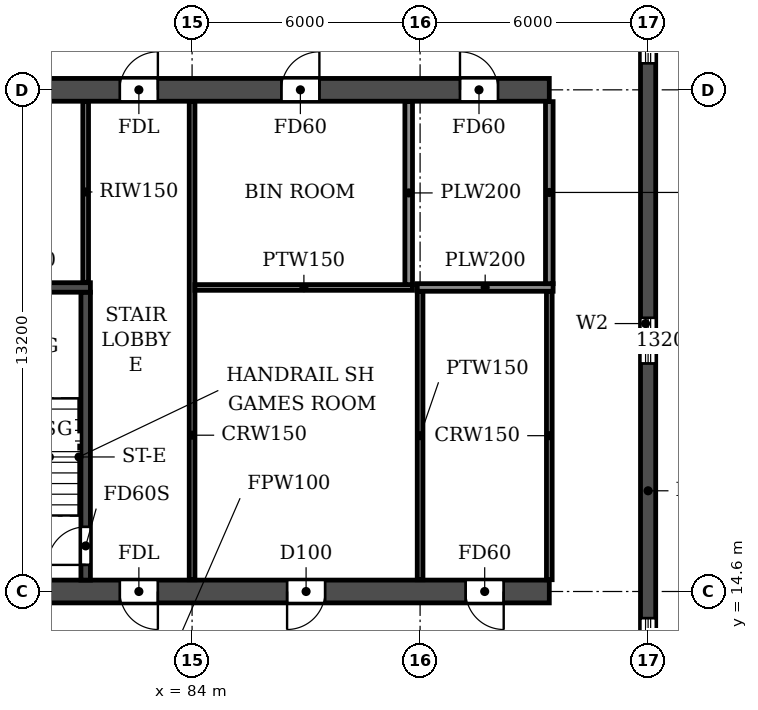
"""IFC4 building model, lengths in metres.
Left out: names, types, materials, properties, quantities, classifications, styles, units other than length and angle.
Written with IfcOpenShell. Run it as: python <this file> out.ifc"""

import sys

from ifc_helpers import new_model, si_unit, direction, frame, frame_2d, origin, place, context, subcontext, project, spatial, rectangle, extrude, element, fill, save


model = new_model("IFC4")
c1 = context("Model", 3, precision=1e-05, world=origin(), true_north=direction((0.0, 1.0)))
c2 = subcontext(c1, "Body", "Model", "MODEL_VIEW")
j1 = project(units=[si_unit("LENGTHUNIT", "METRE"), si_unit("PLANEANGLEUNIT", "RADIAN")], contexts=[c1])
p1 = place(None, origin())
s1 = spatial("IfcSite", under=j1, at=p1, CompositionType="ELEMENT")
p2 = place(p1, origin())
s2 = spatial("IfcBuilding", under=s1, at=p2, CompositionType="ELEMENT")
p3 = place(p2, frame((0.0, 0.0, 63.0)))
s3 = spatial("IfcBuildingStorey", under=s2, at=p3, CompositionType="ELEMENT", Elevation=63.0)
p4 = place(p3, frame((96.0, 4.683, 0.0), z_axis=(0.0, 0.0, 1.0), x_axis=(0.0, 1.0, 0.0)))
e1 = element("IfcWall", 1, at=p4, inside=s3, PredefinedType="SHEAR", context=c2, shape_type="SweptSolid", body=[
    extrude(rectangle(XDim=35.434, YDim=0.4, at=frame_2d((17.717, 0.0))), origin(), (0.0, 0.0, 1.0), 2.95),
])
p5 = place(p4, frame((15.917, 0.0, 0.9)))
e2 = element("IfcOpeningElement", 2, at=p5, cuts=e1, PredefinedType="OPENING", context=c2, shape_type="SweptSolid", body=[
    extrude(rectangle(XDim=1.2, YDim=1.5, at=frame_2d((0.6, 0.75))), frame((0.0, 0.21, 0.0), z_axis=(0.0, -1.0, 0.0), x_axis=(1.0, 0.0, 0.0)), (0.0, 0.0, 1.0), 0.42),
])
p6 = place(p4, frame((23.817, 0.0, 0.9)))
e3 = element("IfcOpeningElement", 3, at=p6, cuts=e1, PredefinedType="OPENING", context=c2, shape_type="SweptSolid", body=[
    extrude(rectangle(XDim=1.2, YDim=1.5, at=frame_2d((0.6, 0.75))), frame((0.0, 0.21, 0.0), z_axis=(0.0, -1.0, 0.0), x_axis=(1.0, 0.0, 0.0)), (0.0, 0.0, 1.0), 0.42),
])
p7 = place(p4, frame((8.017, 0.0, 0.9)))
e4 = element("IfcOpeningElement", 4, at=p7, cuts=e1, PredefinedType="OPENING", context=c2, shape_type="SweptSolid", body=[
    extrude(rectangle(XDim=1.2, YDim=1.5, at=frame_2d((0.6, 0.75))), frame((0.0, 0.21, 0.0), z_axis=(0.0, -1.0, 0.0), x_axis=(1.0, 0.0, 0.0)), (0.0, 0.0, 1.0), 0.42),
])
p8 = place(p4, frame((29.493, 0.0, 0.6)))
e5 = element("IfcOpeningElement", 5, at=p8, cuts=e1, PredefinedType="OPENING", context=c2, shape_type="SweptSolid", body=[
    extrude(rectangle(XDim=2.2, YDim=1.8, at=frame_2d((1.1, 0.9))), frame((0.0, 0.21, 0.0), z_axis=(0.0, -1.0, 0.0), x_axis=(1.0, 0.0, 0.0)), (0.0, 0.0, 1.0), 0.42),
])
p9 = place(p4, frame((2.541, 0.0, 0.6)))
e6 = element("IfcOpeningElement", 6, at=p9, cuts=e1, PredefinedType="OPENING", context=c2, shape_type="SweptSolid", body=[
    extrude(rectangle(XDim=2.2, YDim=1.8, at=frame_2d((1.1, 0.9))), frame((0.0, 0.21, 0.0), z_axis=(0.0, -1.0, 0.0), x_axis=(1.0, 0.0, 0.0)), (0.0, 0.0, 1.0), 0.42),
])
p10 = place(p3, frame((8.6, 14.6, 0.0), z_axis=(0.0, 0.0, 1.0), x_axis=(1.0, 0.0, 0.0)))
e7 = element("IfcWall", 7, at=p10, inside=s3, PredefinedType="SOLIDWALL", context=c2, shape_type="SweptSolid", body=[
    extrude(rectangle(XDim=84.8, YDim=0.6, at=frame_2d((42.4, 0.0))), origin(), (0.0, 0.0, 1.0), 2.95),
])
p11 = place(p10, frame((1.35, 0.0, 0.0)))
e8 = element("IfcOpeningElement", 8, at=p11, cuts=e7, PredefinedType="OPENING", context=c2, shape_type="SweptSolid", body=[
    extrude(rectangle(XDim=1.0, YDim=2.1, at=frame_2d((0.5, 1.05))), frame((0.0, 0.31, 0.0), z_axis=(0.0, -1.0, 0.0), x_axis=(1.0, 0.0, 0.0)), (0.0, 0.0, 1.0), 0.62),
])
p12 = place(p10, frame((6.05, 0.0, 0.0)))
e9 = element("IfcOpeningElement", 9, at=p12, cuts=e7, PredefinedType="OPENING", context=c2, shape_type="SweptSolid", body=[
    extrude(rectangle(XDim=1.0, YDim=2.1, at=frame_2d((0.5, 1.05))), frame((0.0, 0.31, 0.0), z_axis=(0.0, -1.0, 0.0), x_axis=(1.0, 0.0, 0.0)), (0.0, 0.0, 1.0), 0.62),
])
p13 = place(p10, frame((10.3, 0.0, 0.0)))
e10 = element("IfcOpeningElement", 10, at=p13, cuts=e7, PredefinedType="OPENING", context=c2, shape_type="SweptSolid", body=[
    extrude(rectangle(XDim=1.0, YDim=2.1, at=frame_2d((0.5, 1.05))), frame((0.0, 0.31, 0.0), z_axis=(0.0, -1.0, 0.0), x_axis=(1.0, 0.0, 0.0)), (0.0, 0.0, 1.0), 0.62),
])
p14 = place(p10, frame((18.2, 0.0, 0.0)))
e11 = element("IfcOpeningElement", 11, at=p14, cuts=e7, PredefinedType="OPENING", context=c2, shape_type="SweptSolid", body=[
    extrude(rectangle(XDim=1.0, YDim=2.1, at=frame_2d((0.5, 1.05))), frame((0.0, 0.31, 0.0), z_axis=(0.0, -1.0, 0.0), x_axis=(1.0, 0.0, 0.0)), (0.0, 0.0, 1.0), 0.62),
])
p15 = place(p10, frame((22.8, 0.0, 0.0)))
e12 = element("IfcOpeningElement", 12, at=p15, cuts=e7, PredefinedType="OPENING", context=c2, shape_type="SweptSolid", body=[
    extrude(rectangle(XDim=1.0, YDim=2.1, at=frame_2d((0.5, 1.05))), frame((0.0, 0.31, 0.0), z_axis=(0.0, -1.0, 0.0), x_axis=(1.0, 0.0, 0.0)), (0.0, 0.0, 1.0), 0.62),
])
p16 = place(p10, frame((35.4, 0.0, 0.0)))
e13 = element("IfcOpeningElement", 13, at=p16, cuts=e7, PredefinedType="OPENING", context=c2, shape_type="SweptSolid", body=[
    extrude(rectangle(XDim=1.0, YDim=2.1, at=frame_2d((0.5, 1.05))), frame((0.0, 0.31, 0.0), z_axis=(0.0, -1.0, 0.0), x_axis=(1.0, 0.0, 0.0)), (0.0, 0.0, 1.0), 0.62),
])
p17 = place(p10, frame((39.3, 0.0, 0.0)))
e14 = element("IfcOpeningElement", 14, at=p17, cuts=e7, PredefinedType="OPENING", context=c2, shape_type="SweptSolid", body=[
    extrude(rectangle(XDim=1.0, YDim=2.1, at=frame_2d((0.5, 1.05))), frame((0.0, 0.31, 0.0), z_axis=(0.0, -1.0, 0.0), x_axis=(1.0, 0.0, 0.0)), (0.0, 0.0, 1.0), 0.62),
])
p18 = place(p10, frame((41.9, 0.0, 0.0)))
e15 = element("IfcOpeningElement", 15, at=p18, cuts=e7, PredefinedType="OPENING", context=c2, shape_type="SweptSolid", body=[
    extrude(rectangle(XDim=1.0, YDim=2.1, at=frame_2d((0.5, 1.05))), frame((0.0, 0.31, 0.0), z_axis=(0.0, -1.0, 0.0), x_axis=(1.0, 0.0, 0.0)), (0.0, 0.0, 1.0), 0.62),
])
p19 = place(p10, frame((47.1, 0.0, 0.0)))
e16 = element("IfcOpeningElement", 16, at=p19, cuts=e7, PredefinedType="OPENING", context=c2, shape_type="SweptSolid", body=[
    extrude(rectangle(XDim=1.0, YDim=2.1, at=frame_2d((0.5, 1.05))), frame((0.0, 0.31, 0.0), z_axis=(0.0, -1.0, 0.0), x_axis=(1.0, 0.0, 0.0)), (0.0, 0.0, 1.0), 0.62),
])
p20 = place(p10, frame((61.0, 0.0, 0.0)))
e17 = element("IfcOpeningElement", 17, at=p20, cuts=e7, PredefinedType="OPENING", context=c2, shape_type="SweptSolid", body=[
    extrude(rectangle(XDim=1.0, YDim=2.1, at=frame_2d((0.5, 1.05))), frame((0.0, 0.31, 0.0), z_axis=(0.0, -1.0, 0.0), x_axis=(1.0, 0.0, 0.0)), (0.0, 0.0, 1.0), 0.62),
])
p21 = place(p10, frame((65.6, 0.0, 0.0)))
e18 = element("IfcOpeningElement", 18, at=p21, cuts=e7, PredefinedType="OPENING", context=c2, shape_type="SweptSolid", body=[
    extrude(rectangle(XDim=1.0, YDim=2.1, at=frame_2d((0.5, 1.05))), frame((0.0, 0.31, 0.0), z_axis=(0.0, -1.0, 0.0), x_axis=(1.0, 0.0, 0.0)), (0.0, 0.0, 1.0), 0.62),
])
p22 = place(p10, frame((73.5, 0.0, 0.0)))
e19 = element("IfcOpeningElement", 19, at=p22, cuts=e7, PredefinedType="OPENING", context=c2, shape_type="SweptSolid", body=[
    extrude(rectangle(XDim=1.0, YDim=2.1, at=frame_2d((0.5, 1.05))), frame((0.0, 0.31, 0.0), z_axis=(0.0, -1.0, 0.0), x_axis=(1.0, 0.0, 0.0)), (0.0, 0.0, 1.0), 0.62),
])
p23 = place(p10, frame((77.9, 0.0, 0.0)))
e20 = element("IfcOpeningElement", 20, at=p23, cuts=e7, PredefinedType="OPENING", context=c2, shape_type="SweptSolid", body=[
    extrude(rectangle(XDim=1.0, YDim=2.1, at=frame_2d((0.5, 1.05))), frame((0.0, 0.31, 0.0), z_axis=(0.0, -1.0, 0.0), x_axis=(1.0, 0.0, 0.0)), (0.0, 0.0, 1.0), 0.62),
])
p24 = place(p10, frame((82.6, 0.0, 0.0)))
e21 = element("IfcOpeningElement", 21, at=p24, cuts=e7, PredefinedType="OPENING", context=c2, shape_type="SweptSolid", body=[
    extrude(rectangle(XDim=1.0, YDim=2.1, at=frame_2d((0.5, 1.05))), frame((0.0, 0.31, 0.0), z_axis=(0.0, -1.0, 0.0), x_axis=(1.0, 0.0, 0.0)), (0.0, 0.0, 1.0), 0.62),
])
p25 = place(p3, frame((8.6, 27.8, 0.0), z_axis=(0.0, 0.0, 1.0), x_axis=(1.0, 0.0, 0.0)))
e22 = element("IfcWall", 22, at=p25, inside=s3, PredefinedType="SOLIDWALL", context=c2, shape_type="SweptSolid", body=[
    extrude(rectangle(XDim=84.8, YDim=0.6, at=frame_2d((42.4, 0.0))), origin(), (0.0, 0.0, 1.0), 2.95),
])
p26 = place(p25, frame((1.2, 0.0, 0.0)))
e23 = element("IfcOpeningElement", 23, at=p26, cuts=e22, PredefinedType="OPENING", context=c2, shape_type="SweptSolid", body=[
    extrude(rectangle(XDim=1.0, YDim=2.1, at=frame_2d((0.5, 1.05))), frame((0.0, 0.31, 0.0), z_axis=(0.0, -1.0, 0.0), x_axis=(1.0, 0.0, 0.0)), (0.0, 0.0, 1.0), 0.62),
])
p27 = place(p25, frame((5.9, 0.0, 0.0)))
e24 = element("IfcOpeningElement", 24, at=p27, cuts=e22, PredefinedType="OPENING", context=c2, shape_type="SweptSolid", body=[
    extrude(rectangle(XDim=1.0, YDim=2.1, at=frame_2d((0.5, 1.05))), frame((0.0, 0.31, 0.0), z_axis=(0.0, -1.0, 0.0), x_axis=(1.0, 0.0, 0.0)), (0.0, 0.0, 1.0), 0.62),
])
p28 = place(p25, frame((10.3, 0.0, 0.0)))
e25 = element("IfcOpeningElement", 25, at=p28, cuts=e22, PredefinedType="OPENING", context=c2, shape_type="SweptSolid", body=[
    extrude(rectangle(XDim=1.0, YDim=2.1, at=frame_2d((0.5, 1.05))), frame((0.0, 0.31, 0.0), z_axis=(0.0, -1.0, 0.0), x_axis=(1.0, 0.0, 0.0)), (0.0, 0.0, 1.0), 0.62),
])
p29 = place(p25, frame((13.65, 0.0, 0.0)))
e26 = element("IfcOpeningElement", 26, at=p29, cuts=e22, PredefinedType="OPENING", context=c2, shape_type="SweptSolid", body=[
    extrude(rectangle(XDim=0.9, YDim=2.1, at=frame_2d((0.45, 1.05))), frame((0.0, 0.31, 0.0), z_axis=(0.0, -1.0, 0.0), x_axis=(1.0, 0.0, 0.0)), (0.0, 0.0, 1.0), 0.62),
])
p30 = place(p25, frame((22.85, 0.0, 0.0)))
e27 = element("IfcOpeningElement", 27, at=p30, cuts=e22, PredefinedType="OPENING", context=c2, shape_type="SweptSolid", body=[
    extrude(rectangle(XDim=0.9, YDim=2.1, at=frame_2d((0.45, 1.05))), frame((0.0, 0.31, 0.0), z_axis=(0.0, -1.0, 0.0), x_axis=(1.0, 0.0, 0.0)), (0.0, 0.0, 1.0), 0.62),
])
p31 = place(p25, frame((27.3, 0.0, 0.0)))
e28 = element("IfcOpeningElement", 28, at=p31, cuts=e22, PredefinedType="OPENING", context=c2, shape_type="SweptSolid", body=[
    extrude(rectangle(XDim=1.0, YDim=2.1, at=frame_2d((0.5, 1.05))), frame((0.0, 0.31, 0.0), z_axis=(0.0, -1.0, 0.0), x_axis=(1.0, 0.0, 0.0)), (0.0, 0.0, 1.0), 0.62),
])
p32 = place(p25, frame((32.5, 0.0, 0.0)))
e29 = element("IfcOpeningElement", 29, at=p32, cuts=e22, PredefinedType="OPENING", context=c2, shape_type="SweptSolid", body=[
    extrude(rectangle(XDim=1.0, YDim=2.1, at=frame_2d((0.5, 1.05))), frame((0.0, 0.31, 0.0), z_axis=(0.0, -1.0, 0.0), x_axis=(1.0, 0.0, 0.0)), (0.0, 0.0, 1.0), 0.62),
])
p33 = place(p25, frame((39.0, 0.0, 0.0)))
e30 = element("IfcOpeningElement", 30, at=p33, cuts=e22, PredefinedType="OPENING", context=c2, shape_type="SweptSolid", body=[
    extrude(rectangle(XDim=1.0, YDim=2.1, at=frame_2d((0.5, 1.05))), frame((0.0, 0.31, 0.0), z_axis=(0.0, -1.0, 0.0), x_axis=(1.0, 0.0, 0.0)), (0.0, 0.0, 1.0), 0.62),
])
p34 = place(p25, frame((41.9, 0.0, 0.0)))
e31 = element("IfcOpeningElement", 31, at=p34, cuts=e22, PredefinedType="OPENING", context=c2, shape_type="SweptSolid", body=[
    extrude(rectangle(XDim=1.0, YDim=2.1, at=frame_2d((0.5, 1.05))), frame((0.0, 0.31, 0.0), z_axis=(0.0, -1.0, 0.0), x_axis=(1.0, 0.0, 0.0)), (0.0, 0.0, 1.0), 0.62),
])
p35 = place(p25, frame((47.4, 0.0, 0.0)))
e32 = element("IfcOpeningElement", 32, at=p35, cuts=e22, PredefinedType="OPENING", context=c2, shape_type="SweptSolid", body=[
    extrude(rectangle(XDim=1.0, YDim=2.1, at=frame_2d((0.5, 1.05))), frame((0.0, 0.31, 0.0), z_axis=(0.0, -1.0, 0.0), x_axis=(1.0, 0.0, 0.0)), (0.0, 0.0, 1.0), 0.62),
])
p36 = place(p25, frame((53.9, 0.0, 0.0)))
e33 = element("IfcOpeningElement", 33, at=p36, cuts=e22, PredefinedType="OPENING", context=c2, shape_type="SweptSolid", body=[
    extrude(rectangle(XDim=1.0, YDim=2.1, at=frame_2d((0.5, 1.05))), frame((0.0, 0.31, 0.0), z_axis=(0.0, -1.0, 0.0), x_axis=(1.0, 0.0, 0.0)), (0.0, 0.0, 1.0), 0.62),
])
p37 = place(p25, frame((57.8, 0.0, 0.0)))
e34 = element("IfcOpeningElement", 34, at=p37, cuts=e22, PredefinedType="OPENING", context=c2, shape_type="SweptSolid", body=[
    extrude(rectangle(XDim=1.0, YDim=2.1, at=frame_2d((0.5, 1.05))), frame((0.0, 0.31, 0.0), z_axis=(0.0, -1.0, 0.0), x_axis=(1.0, 0.0, 0.0)), (0.0, 0.0, 1.0), 0.62),
])
p38 = place(p25, frame((61.05, 0.0, 0.0)))
e35 = element("IfcOpeningElement", 35, at=p38, cuts=e22, PredefinedType="OPENING", context=c2, shape_type="SweptSolid", body=[
    extrude(rectangle(XDim=0.9, YDim=2.1, at=frame_2d((0.45, 1.05))), frame((0.0, 0.31, 0.0), z_axis=(0.0, -1.0, 0.0), x_axis=(1.0, 0.0, 0.0)), (0.0, 0.0, 1.0), 0.62),
])
p39 = place(p25, frame((70.25, 0.0, 0.0)))
e36 = element("IfcOpeningElement", 36, at=p39, cuts=e22, PredefinedType="OPENING", context=c2, shape_type="SweptSolid", body=[
    extrude(rectangle(XDim=0.9, YDim=2.1, at=frame_2d((0.45, 1.05))), frame((0.0, 0.31, 0.0), z_axis=(0.0, -1.0, 0.0), x_axis=(1.0, 0.0, 0.0)), (0.0, 0.0, 1.0), 0.62),
])
p40 = place(p25, frame((73.5, 0.0, 0.0)))
e37 = element("IfcOpeningElement", 37, at=p40, cuts=e22, PredefinedType="OPENING", context=c2, shape_type="SweptSolid", body=[
    extrude(rectangle(XDim=1.0, YDim=2.1, at=frame_2d((0.5, 1.05))), frame((0.0, 0.31, 0.0), z_axis=(0.0, -1.0, 0.0), x_axis=(1.0, 0.0, 0.0)), (0.0, 0.0, 1.0), 0.62),
])
p41 = place(p25, frame((77.75, 0.0, 0.0)))
e38 = element("IfcOpeningElement", 38, at=p41, cuts=e22, PredefinedType="OPENING", context=c2, shape_type="SweptSolid", body=[
    extrude(rectangle(XDim=1.0, YDim=2.1, at=frame_2d((0.5, 1.05))), frame((0.0, 0.31, 0.0), z_axis=(0.0, -1.0, 0.0), x_axis=(1.0, 0.0, 0.0)), (0.0, 0.0, 1.0), 0.62),
])
p42 = place(p25, frame((82.45, 0.0, 0.0)))
e39 = element("IfcOpeningElement", 39, at=p42, cuts=e22, PredefinedType="OPENING", context=c2, shape_type="SweptSolid", body=[
    extrude(rectangle(XDim=1.0, YDim=2.1, at=frame_2d((0.5, 1.05))), frame((0.0, 0.31, 0.0), z_axis=(0.0, -1.0, 0.0), x_axis=(1.0, 0.0, 0.0)), (0.0, 0.0, 1.0), 0.62),
])
p43 = place(p3, frame((81.2, 14.9, 0.0), z_axis=(0.0, 0.0, 1.0), x_axis=(0.0, 1.0, 0.0)))
e40 = element("IfcWall", 40, at=p43, inside=s3, PredefinedType="SOLIDWALL", context=c2, shape_type="SweptSolid", body=[
    extrude(rectangle(XDim=7.575, YDim=0.25, at=frame_2d((3.788, 0.0))), origin(), (0.0, 0.0, 1.0), 2.95),
])
p44 = place(p43, frame((0.4, 0.0, 0.0)))
e41 = element("IfcOpeningElement", 41, at=p44, cuts=e40, PredefinedType="OPENING", context=c2, shape_type="SweptSolid", body=[
    extrude(rectangle(XDim=1.0, YDim=2.1, at=frame_2d((0.5, 1.05))), frame((0.0, 0.135, 0.0), z_axis=(0.0, -1.0, 0.0), x_axis=(1.0, 0.0, 0.0)), (0.0, 0.0, 1.0), 0.27),
])
p45 = place(p3, frame((77.275, 22.6, 0.0), z_axis=(0.0, 0.0, 1.0), x_axis=(1.0, 0.0, 0.0)))
e42 = element("IfcWall", 42, at=p45, inside=s3, PredefinedType="SOLIDWALL", context=c2, shape_type="SweptSolid", body=[
    extrude(rectangle(XDim=4.05, YDim=0.25, at=frame_2d((2.025, 0.0))), origin(), (0.0, 0.0, 1.0), 2.95),
])
p46 = place(p3, frame((84.0, 14.91, 0.0), z_axis=(0.0, 0.0, 1.0), x_axis=(0.0, 1.0, 0.0)))
e43 = element("IfcWall", 43, at=p46, inside=s3, PredefinedType="PARTITIONING", context=c2, shape_type="SweptSolid", body=[
    extrude(rectangle(XDim=12.58, YDim=0.15, at=frame_2d((6.29, 0.0))), origin(), (0.0, 0.0, 1.0), 2.95),
])
p47 = place(p3, frame((93.4, 14.91, 0.0), z_axis=(0.0, 0.0, 1.0), x_axis=(0.0, 1.0, 0.0)))
e44 = element("IfcWall", 44, at=p47, inside=s3, PredefinedType="PARTITIONING", context=c2, shape_type="SweptSolid", body=[
    extrude(rectangle(XDim=7.59, YDim=0.15, at=frame_2d((3.795, 0.0))), origin(), (0.0, 0.0, 1.0), 2.95),
])
p48 = place(p3, frame((84.075, 22.6, 0.0), z_axis=(0.0, 0.0, 1.0), x_axis=(1.0, 0.0, 0.0)))
e45 = element("IfcWall", 45, at=p48, inside=s3, PredefinedType="PARTITIONING", context=c2, shape_type="SweptSolid", body=[
    extrude(rectangle(XDim=5.725, YDim=0.15, at=frame_2d((2.863, 0.0))), origin(), (0.0, 0.0, 1.0), 2.95),
])
p49 = place(p3, frame((90.0, 14.91, 0.0), z_axis=(0.0, 0.0, 1.0), x_axis=(0.0, 1.0, 0.0)))
e46 = element("IfcWall", 46, at=p49, inside=s3, PredefinedType="PARTITIONING", context=c2, shape_type="SweptSolid", body=[
    extrude(rectangle(XDim=7.59, YDim=0.15, at=frame_2d((3.795, 0.0))), origin(), (0.0, 0.0, 1.0), 2.95),
])
p50 = place(p3, frame((89.925, 22.6, 0.0), z_axis=(0.0, 0.0, 1.0), x_axis=(1.0, 0.0, 0.0)))
e47 = element("IfcWall", 47, at=p50, inside=s3, PredefinedType="PARTITIONING", context=c2, shape_type="SweptSolid", body=[
    extrude(rectangle(XDim=3.575, YDim=0.2, at=frame_2d((1.788, 0.0))), origin(), (0.0, 0.0, 1.0), 2.95),
])
p51 = place(p3, frame((89.7, 22.675, 0.0), z_axis=(0.0, 0.0, 1.0), x_axis=(0.0, 1.0, 0.0)))
e48 = element("IfcWall", 48, at=p51, inside=s3, PredefinedType="PARTITIONING", context=c2, shape_type="SweptSolid", body=[
    extrude(rectangle(XDim=4.815, YDim=0.2, at=frame_2d((2.407, 0.0))), origin(), (0.0, 0.0, 1.0), 2.95),
])
p52 = place(p3, frame((93.4, 22.7, 0.0), z_axis=(0.0, 0.0, 1.0), x_axis=(0.0, 1.0, 0.0)))
e49 = element("IfcWall", 49, at=p52, inside=s3, PredefinedType="PARTITIONING", context=c2, shape_type="SweptSolid", body=[
    extrude(rectangle(XDim=4.79, YDim=0.2, at=frame_2d((2.395, 0.0))), origin(), (0.0, 0.0, 1.0), 2.95),
])
p53 = place(p3, frame((81.2, 22.735, 0.0), z_axis=(0.0, 0.0, 1.0), x_axis=(0.0, 1.0, 0.0)))
e50 = element("IfcWall", 50, at=p53, inside=s3, PredefinedType="PARTITIONING", context=c2, shape_type="SweptSolid", body=[
    extrude(rectangle(XDim=4.755, YDim=0.15, at=frame_2d((2.377, 0.0))), origin(), (0.0, 0.0, 1.0), 2.95),
])
p54 = place(p5, origin())
e51 = element("IfcWindow", 51, at=p54, inside=s3, PartitioningType="SINGLE_PANEL", PredefinedType="WINDOW", context=c2, shape_type="SweptSolid", body=[
    extrude(rectangle(XDim=1.2, YDim=1.5, at=frame_2d((0.6, 0.75))), frame((0.0, 0.03, 0.0), z_axis=(0.0, -1.0, 0.0), x_axis=(1.0, 0.0, 0.0)), (0.0, 0.0, 1.0), 0.06),
])
fill(e2, e51)
p55 = place(p6, origin())
e52 = element("IfcWindow", 52, at=p55, inside=s3, PartitioningType="SINGLE_PANEL", PredefinedType="WINDOW", context=c2, shape_type="SweptSolid", body=[
    extrude(rectangle(XDim=1.2, YDim=1.5, at=frame_2d((0.6, 0.75))), frame((0.0, 0.03, 0.0), z_axis=(0.0, -1.0, 0.0), x_axis=(1.0, 0.0, 0.0)), (0.0, 0.0, 1.0), 0.06),
])
fill(e3, e52)
p56 = place(p7, origin())
e53 = element("IfcWindow", 53, at=p56, inside=s3, PartitioningType="SINGLE_PANEL", PredefinedType="WINDOW", context=c2, shape_type="SweptSolid", body=[
    extrude(rectangle(XDim=1.2, YDim=1.5, at=frame_2d((0.6, 0.75))), frame((0.0, 0.03, 0.0), z_axis=(0.0, -1.0, 0.0), x_axis=(1.0, 0.0, 0.0)), (0.0, 0.0, 1.0), 0.06),
])
fill(e4, e53)
p57 = place(p40, origin())
e54 = element("IfcDoor", 54, at=p57, inside=s3, OperationType="SINGLE_SWING_RIGHT", PredefinedType="DOOR", context=c2, shape_type="SweptSolid", body=[
    extrude(rectangle(XDim=1.0, YDim=2.1, at=frame_2d((0.5, 1.05))), frame((0.0, 0.025, 0.0), z_axis=(0.0, -1.0, 0.0), x_axis=(1.0, 0.0, 0.0)), (0.0, 0.0, 1.0), 0.05),
])
fill(e37, e54)
p58 = place(p41, origin())
e55 = element("IfcDoor", 55, at=p58, inside=s3, OperationType="SINGLE_SWING_RIGHT", PredefinedType="DOOR", context=c2, shape_type="SweptSolid", body=[
    extrude(rectangle(XDim=1.0, YDim=2.1, at=frame_2d((0.5, 1.05))), frame((0.0, 0.025, 0.0), z_axis=(0.0, -1.0, 0.0), x_axis=(1.0, 0.0, 0.0)), (0.0, 0.0, 1.0), 0.05),
])
fill(e38, e55)
p59 = place(p42, origin())
e56 = element("IfcDoor", 56, at=p59, inside=s3, OperationType="SINGLE_SWING_LEFT", PredefinedType="DOOR", context=c2, shape_type="SweptSolid", body=[
    extrude(rectangle(XDim=1.0, YDim=2.1, at=frame_2d((0.5, 1.05))), frame((0.0, 0.025, 0.0), z_axis=(0.0, -1.0, 0.0), x_axis=(1.0, 0.0, 0.0)), (0.0, 0.0, 1.0), 0.05),
])
fill(e39, e56)
p60 = place(p22, frame((1.0, 0.0, 0.0), z_axis=(0.0, 0.0, 1.0), x_axis=(-1.0, 0.0, 0.0)))
e57 = element("IfcDoor", 57, at=p60, inside=s3, OperationType="SINGLE_SWING_LEFT", PredefinedType="DOOR", context=c2, shape_type="SweptSolid", body=[
    extrude(rectangle(XDim=1.0, YDim=2.1, at=frame_2d((0.5, 1.05))), frame((0.0, 0.025, 0.0), z_axis=(0.0, -1.0, 0.0), x_axis=(1.0, 0.0, 0.0)), (0.0, 0.0, 1.0), 0.05),
])
fill(e19, e57)
p61 = place(p23, frame((1.0, 0.0, 0.0), z_axis=(0.0, 0.0, 1.0), x_axis=(-1.0, 0.0, 0.0)))
e58 = element("IfcDoor", 58, at=p61, inside=s3, OperationType="SINGLE_SWING_RIGHT", PredefinedType="DOOR", context=c2, shape_type="SweptSolid", body=[
    extrude(rectangle(XDim=1.0, YDim=2.1, at=frame_2d((0.5, 1.05))), frame((0.0, 0.025, 0.0), z_axis=(0.0, -1.0, 0.0), x_axis=(1.0, 0.0, 0.0)), (0.0, 0.0, 1.0), 0.05),
])
fill(e20, e58)
p62 = place(p24, frame((1.0, 0.0, 0.0), z_axis=(0.0, 0.0, 1.0), x_axis=(-1.0, 0.0, 0.0)))
e59 = element("IfcDoor", 59, at=p62, inside=s3, OperationType="SINGLE_SWING_LEFT", PredefinedType="DOOR", context=c2, shape_type="SweptSolid", body=[
    extrude(rectangle(XDim=1.0, YDim=2.1, at=frame_2d((0.5, 1.05))), frame((0.0, 0.025, 0.0), z_axis=(0.0, -1.0, 0.0), x_axis=(1.0, 0.0, 0.0)), (0.0, 0.0, 1.0), 0.05),
])
fill(e21, e59)
p63 = place(p44, origin())
e60 = element("IfcDoor", 60, at=p63, inside=s3, OperationType="SINGLE_SWING_LEFT", PredefinedType="DOOR", context=c2, shape_type="SweptSolid", body=[
    extrude(rectangle(XDim=1.0, YDim=2.1, at=frame_2d((0.5, 1.05))), frame((0.0, 0.025, 0.0), z_axis=(0.0, -1.0, 0.0), x_axis=(1.0, 0.0, 0.0)), (0.0, 0.0, 1.0), 0.05),
])
fill(e41, e60)
save(model, sys.argv[1])
